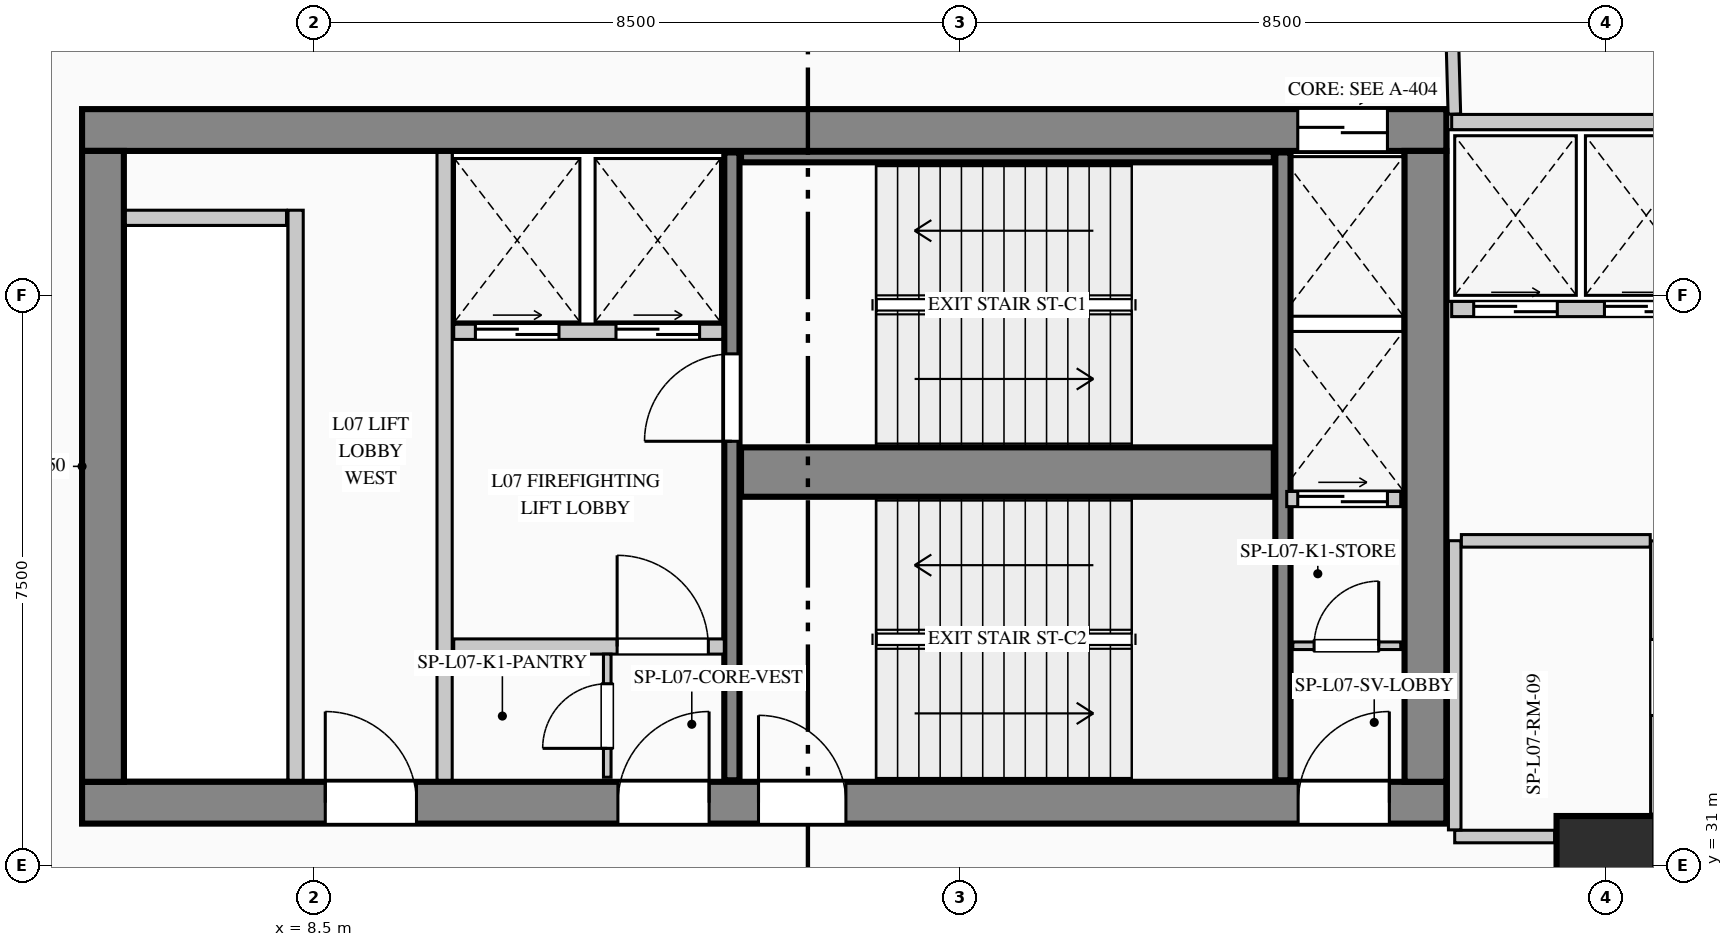
"""IFC4 building model, lengths in metres.
Left out: names, types, materials, properties, quantities, classifications, styles, units other than length and angle.
Written with IfcOpenShell. Run it as: python <this file> out.ifc"""

import sys

from ifc_helpers import new_model, si_unit, direction, frame, frame_2d, origin, origin_2d, place, context, subcontext, project, spatial, rectangle, extrude, element, fill, save


model = new_model("IFC4")
c1 = context("Model", 3, precision=1e-05, world=origin(), true_north=direction((0.0, 1.0)))
c2 = subcontext(c1, "Body", "Model", "MODEL_VIEW")
j1 = project(units=[si_unit("LENGTHUNIT", "METRE"), si_unit("PLANEANGLEUNIT", "RADIAN")], contexts=[c1])
p1 = place(None, origin())
s1 = spatial("IfcSite", under=j1, at=p1, CompositionType="ELEMENT")
p2 = place(p1, origin())
s2 = spatial("IfcBuilding", under=s1, at=p2, CompositionType="ELEMENT")
p3 = place(p2, frame((0.0, 0.0, 31.4)))
s3 = spatial("IfcBuildingStorey", under=s2, at=p3, CompositionType="ELEMENT", Elevation=31.4)
p4 = place(p3, frame((5.45, 40.675, 0.0), z_axis=(0.0, 0.0, 1.0), x_axis=(1.0, 0.0, 0.0)))
e1 = element("IfcWall", 1, at=p4, inside=s3, PredefinedType="SHEAR", context=c2, shape_type="SweptSolid", body=[
    extrude(rectangle(XDim=17.95, YDim=0.55, at=frame_2d((8.975, 0.0))), origin(), (0.0, 0.0, 1.0), 4.4),
])
p5 = place(p4, frame((15.995, 0.0, 0.0)))
e2 = element("IfcOpeningElement", 2, at=p5, cuts=e1, PredefinedType="OPENING", context=c2, shape_type="SweptSolid", body=[
    extrude(rectangle(XDim=1.18, YDim=2.25, at=frame_2d((0.59, 1.125))), frame((0.0, 0.285, 0.0), z_axis=(0.0, -1.0, 0.0), x_axis=(1.0, 0.0, 0.0)), (0.0, 0.0, 1.0), 0.57),
])
p6 = place(p3, frame((5.45, 31.825, 0.0), z_axis=(0.0, 0.0, 1.0), x_axis=(1.0, 0.0, 0.0)))
e3 = element("IfcWall", 3, at=p6, inside=s3, PredefinedType="SHEAR", context=c2, shape_type="SweptSolid", body=[
    extrude(rectangle(XDim=17.95, YDim=0.55, at=frame_2d((8.975, 0.0))), origin(), (0.0, 0.0, 1.0), 4.4),
])
p7 = place(p6, frame((3.2, 0.0, 0.0)))
e4 = element("IfcOpeningElement", 4, at=p7, cuts=e3, PredefinedType="OPENING", context=c2, shape_type="SweptSolid", body=[
    extrude(rectangle(XDim=1.2, YDim=2.2, at=frame_2d((0.6, 1.1))), frame((0.0, 0.285, 0.0), z_axis=(0.0, -1.0, 0.0), x_axis=(1.0, 0.0, 0.0)), (0.0, 0.0, 1.0), 0.57),
])
p8 = place(p6, frame((7.05, 0.0, 0.0)))
e5 = element("IfcOpeningElement", 5, at=p8, cuts=e3, PredefinedType="OPENING", context=c2, shape_type="SweptSolid", body=[
    extrude(rectangle(XDim=1.2, YDim=2.2, at=frame_2d((0.6, 1.1))), frame((0.0, 0.285, 0.0), z_axis=(0.0, -1.0, 0.0), x_axis=(1.0, 0.0, 0.0)), (0.0, 0.0, 1.0), 0.57),
])
p9 = place(p6, frame((8.9, 0.0, 0.0)))
e6 = element("IfcOpeningElement", 6, at=p9, cuts=e3, PredefinedType="OPENING", context=c2, shape_type="SweptSolid", body=[
    extrude(rectangle(XDim=1.15, YDim=2.2, at=frame_2d((0.575, 1.1))), frame((0.0, 0.285, 0.0), z_axis=(0.0, -1.0, 0.0), x_axis=(1.0, 0.0, 0.0)), (0.0, 0.0, 1.0), 0.57),
])
p10 = place(p6, frame((16.0, 0.0, 0.0)))
e7 = element("IfcOpeningElement", 7, at=p10, cuts=e3, PredefinedType="OPENING", context=c2, shape_type="SweptSolid", body=[
    extrude(rectangle(XDim=1.2, YDim=2.2, at=frame_2d((0.6, 1.1))), frame((0.0, 0.285, 0.0), z_axis=(0.0, -1.0, 0.0), x_axis=(1.0, 0.0, 0.0)), (0.0, 0.0, 1.0), 0.57),
])
for number, where, z_axis, x_axis in (
    (8, (5.725, 32.1, 0.0), (0.0, 0.0, 1.0), (0.0, 1.0, 0.0)),
    (9, (23.125, 32.1, 0.0), (0.0, 0.0, 1.0), (0.0, 1.0, 0.0)),
):
    element("IfcWall", number, at=place(p3, frame(where, z_axis=z_axis, x_axis=x_axis)), inside=s3, PredefinedType="SHEAR", context=c2, shape_type="SweptSolid", body=[
        extrude(rectangle(XDim=8.3, YDim=0.55, at=frame_2d((4.15, 0.0))), origin(), (0.0, 0.0, 1.0), 4.4),
    ])
p11 = place(p3, frame((14.0, 32.12, 0.0), z_axis=(0.0, 0.0, 1.0), x_axis=(0.0, 1.0, 0.0)))
e10 = element("IfcWall", 10, at=p11, inside=s3, PredefinedType="SHEAR", context=c2, shape_type="SweptSolid", body=[
    extrude(rectangle(XDim=8.26, YDim=0.2, at=frame_2d((4.13, 0.0))), origin(), (0.0, 0.0, 1.0), 4.4),
])
p12 = place(p11, frame((4.46, 0.0, 0.0)))
e11 = element("IfcOpeningElement", 11, at=p12, cuts=e10, PredefinedType="OPENING", context=c2, shape_type="SweptSolid", body=[
    extrude(rectangle(XDim=1.15, YDim=2.2, at=frame_2d((0.575, 1.1))), frame((0.0, 0.11, 0.0), z_axis=(0.0, -1.0, 0.0), x_axis=(1.0, 0.0, 0.0)), (0.0, 0.0, 1.0), 0.22),
])
p13 = place(p3, frame((14.12, 36.175, 0.0), z_axis=(0.0, 0.0, 1.0), x_axis=(1.0, 0.0, 0.0)))
e12 = element("IfcWall", 12, at=p13, inside=s3, PredefinedType="SHEAR", context=c2, shape_type="SweptSolid", body=[
    extrude(rectangle(XDim=7.01, YDim=0.65, at=frame_2d((3.505, 0.0))), origin(), (0.0, 0.0, 1.0), 4.4),
])
p14 = place(p3, frame((21.25, 32.12, 0.0), z_axis=(0.0, 0.0, 1.0), x_axis=(0.0, 1.0, 0.0)))
e13 = element("IfcWall", 13, at=p14, inside=s3, PredefinedType="SHEAR", context=c2, shape_type="SweptSolid", body=[
    extrude(rectangle(XDim=8.26, YDim=0.2, at=frame_2d((4.13, 0.0))), origin(), (0.0, 0.0, 1.0), 4.4),
])
p15 = place(p3, frame((14.12, 40.32, 0.0), z_axis=(0.0, 0.0, 1.0), x_axis=(1.0, 0.0, 0.0)))
e14 = element("IfcWall", 14, at=p15, inside=s3, PredefinedType="SHEAR", context=c2, shape_type="SweptSolid", body=[
    extrude(rectangle(XDim=7.01, YDim=0.14, at=frame_2d((3.505, 0.0))), origin(), (0.0, 0.0, 1.0), 4.4),
])
p16 = place(p3, frame((25.5, 31.0, 0.0), z_axis=(0.0, 0.0, 1.0), x_axis=(1.0, 0.0, 0.0)))
e15 = element("IfcColumn", 15, at=p16, inside=s3, PredefinedType="COLUMN", context=c2, shape_type="SweptSolid", body=[
    extrude(rectangle(XDim=1.3, YDim=1.3, at=origin_2d()), origin(), (0.0, 0.0, 1.0), 4.4),
])
p17 = place(p3, frame((8.523, 4.84, 0.0), z_axis=(0.0, 0.0, 1.0), x_axis=(-0.150394554312, 0.988626055712, 0.0)))
e16 = element("IfcWall", 16, at=p17, inside=s3, PredefinedType="STANDARD", context=c2, shape_type="SweptSolid", body=[
    extrude(rectangle(XDim=36.738, YDim=0.28, at=frame_2d((18.369, 0.0))), origin(), (0.0, 0.0, 1.0), 4.1),
])
p18 = place(p17, frame((22.762, 0.0, 0.9)))
e17 = element("IfcOpeningElement", 17, at=p18, cuts=e16, PredefinedType="OPENING", context=c2, shape_type="SweptSolid", body=[
    extrude(rectangle(XDim=1.5, YDim=1.8, at=frame_2d((0.75, 0.9))), frame((0.0, 0.15, 0.0), z_axis=(0.0, -1.0, 0.0), x_axis=(1.0, 0.0, 0.0)), (0.0, 0.0, 1.0), 0.3),
])
p19 = place(p3, frame((8.26, 32.12, 0.0), z_axis=(0.0, 0.0, 1.0), x_axis=(0.0, 1.0, 0.0)))
e18 = element("IfcWall", 18, at=p19, inside=s3, PredefinedType="PARTITIONING", context=c2, shape_type="SweptSolid", body=[
    extrude(rectangle(XDim=7.5, YDim=0.2, at=frame_2d((3.75, 0.0))), origin(), (0.0, 0.0, 1.0), 4.1),
])
p20 = place(p3, frame((6.02, 39.52, 0.0), z_axis=(0.0, 0.0, 1.0), x_axis=(1.0, 0.0, 0.0)))
e19 = element("IfcWall", 19, at=p20, inside=s3, PredefinedType="PARTITIONING", context=c2, shape_type="SweptSolid", body=[
    extrude(rectangle(XDim=2.12, YDim=0.2, at=frame_2d((1.06, 0.0))), origin(), (0.0, 0.0, 1.0), 4.1),
])
p21 = place(p3, frame((10.22, 32.12, 0.0), z_axis=(0.0, 0.0, 1.0), x_axis=(0.0, 1.0, 0.0)))
e20 = element("IfcWall", 20, at=p21, inside=s3, PredefinedType="PARTITIONING", context=c2, shape_type="SweptSolid", body=[
    extrude(rectangle(XDim=8.26, YDim=0.2, at=frame_2d((4.13, 0.0))), origin(), (0.0, 0.0, 1.0), 4.1),
])
p22 = place(p3, frame((10.34, 38.02, 0.0), z_axis=(0.0, 0.0, 1.0), x_axis=(1.0, 0.0, 0.0)))
e21 = element("IfcWall", 21, at=p22, inside=s3, PredefinedType="PARTITIONING", context=c2, shape_type="SweptSolid", body=[
    extrude(rectangle(XDim=3.54, YDim=0.2, at=frame_2d((1.77, 0.0))), origin(), (0.0, 0.0, 1.0), 4.1),
])
p23 = place(p22, frame((0.285, 0.0, 0.0)))
e22 = element("IfcOpeningElement", 22, at=p23, cuts=e21, PredefinedType="OPENING", context=c2, shape_type="SweptSolid", body=[
    extrude(rectangle(XDim=1.1, YDim=2.2, at=frame_2d((0.55, 1.1))), frame((0.0, 0.11, 0.0), z_axis=(0.0, -1.0, 0.0), x_axis=(1.0, 0.0, 0.0)), (0.0, 0.0, 1.0), 0.22),
])
p24 = place(p22, frame((2.135, 0.0, 0.0)))
e23 = element("IfcOpeningElement", 23, at=p24, cuts=e21, PredefinedType="OPENING", context=c2, shape_type="SweptSolid", body=[
    extrude(rectangle(XDim=1.1, YDim=2.2, at=frame_2d((0.55, 1.1))), frame((0.0, 0.11, 0.0), z_axis=(0.0, -1.0, 0.0), x_axis=(1.0, 0.0, 0.0)), (0.0, 0.0, 1.0), 0.22),
])
p25 = place(p3, frame((10.34, 33.88, 0.0), z_axis=(0.0, 0.0, 1.0), x_axis=(1.0, 0.0, 0.0)))
e24 = element("IfcWall", 24, at=p25, inside=s3, PredefinedType="PARTITIONING", context=c2, shape_type="SweptSolid", body=[
    extrude(rectangle(XDim=3.56, YDim=0.2, at=frame_2d((1.78, 0.0))), origin(), (0.0, 0.0, 1.0), 4.1),
])
p26 = place(p25, frame((2.15, 0.0, 0.0)))
e25 = element("IfcOpeningElement", 25, at=p26, cuts=e24, PredefinedType="OPENING", context=c2, shape_type="SweptSolid", body=[
    extrude(rectangle(XDim=1.2, YDim=2.2, at=frame_2d((0.6, 1.1))), frame((0.0, 0.11, 0.0), z_axis=(0.0, -1.0, 0.0), x_axis=(1.0, 0.0, 0.0)), (0.0, 0.0, 1.0), 0.22),
])
p27 = place(p3, frame((12.36, 32.16, 0.0), z_axis=(0.0, 0.0, 1.0), x_axis=(0.0, 1.0, 0.0)))
e26 = element("IfcWall", 26, at=p27, inside=s3, PredefinedType="PARTITIONING", context=c2, shape_type="SweptSolid", body=[
    extrude(rectangle(XDim=1.62, YDim=0.1, at=frame_2d((0.81, 0.0))), origin(), (0.0, 0.0, 1.0), 4.1),
])
p28 = place(p27, frame((0.38, 0.0, 0.0)))
e27 = element("IfcOpeningElement", 27, at=p28, cuts=e26, PredefinedType="OPENING", context=c2, shape_type="SweptSolid", body=[
    extrude(rectangle(XDim=0.85, YDim=2.1, at=frame_2d((0.425, 1.05))), frame((0.0, 0.06, 0.0), z_axis=(0.0, -1.0, 0.0), x_axis=(1.0, 0.0, 0.0)), (0.0, 0.0, 1.0), 0.12),
])
p29 = place(p3, frame((21.38, 33.89, 0.0), z_axis=(0.0, 0.0, 1.0), x_axis=(1.0, 0.0, 0.0)))
e28 = element("IfcWall", 28, at=p29, inside=s3, PredefinedType="PARTITIONING", context=c2, shape_type="SweptSolid", body=[
    extrude(rectangle(XDim=1.42, YDim=0.1, at=frame_2d((0.71, 0.0))), origin(), (0.0, 0.0, 1.0), 4.1),
])
p30 = place(p29, frame((0.28, 0.0, 0.0)))
e29 = element("IfcOpeningElement", 29, at=p30, cuts=e28, PredefinedType="OPENING", context=c2, shape_type="SweptSolid", body=[
    extrude(rectangle(XDim=0.85, YDim=2.1, at=frame_2d((0.425, 1.05))), frame((0.0, 0.06, 0.0), z_axis=(0.0, -1.0, 0.0), x_axis=(1.0, 0.0, 0.0)), (0.0, 0.0, 1.0), 0.12),
])
p31 = place(p3, frame((21.3, 35.82, 0.0), z_axis=(0.0, 0.0, 1.0), x_axis=(1.0, 0.0, 0.0)))
e30 = element("IfcWall", 30, at=p31, inside=s3, PredefinedType="PARTITIONING", context=c2, shape_type="SweptSolid", body=[
    extrude(rectangle(XDim=1.5, YDim=0.2, at=frame_2d((0.75, 0.0))), origin(), (0.0, 0.0, 1.0), 4.1),
])
p32 = place(p31, frame((0.145, 0.0, 0.0)))
e31 = element("IfcOpeningElement", 31, at=p32, cuts=e30, PredefinedType="OPENING", context=c2, shape_type="SweptSolid", body=[
    extrude(rectangle(XDim=1.18, YDim=2.25, at=frame_2d((0.59, 1.125))), frame((0.0, 0.11, 0.0), z_axis=(0.0, -1.0, 0.0), x_axis=(1.0, 0.0, 0.0)), (0.0, 0.0, 1.0), 0.22),
])
p33 = place(p3, frame((23.47, 40.78, 0.0), z_axis=(0.0, 0.0, 1.0), x_axis=(1.0, 0.0, 0.0)))
e32 = element("IfcWall", 32, at=p33, inside=s3, PredefinedType="PARTITIONING", context=c2, shape_type="SweptSolid", body=[
    extrude(rectangle(XDim=6.91, YDim=0.2, at=frame_2d((3.455, 0.0))), origin(), (0.0, 0.0, 1.0), 4.1),
])
p34 = place(p3, frame((23.47, 38.32, 0.0), z_axis=(0.0, 0.0, 1.0), x_axis=(1.0, 0.0, 0.0)))
e33 = element("IfcWall", 33, at=p34, inside=s3, PredefinedType="PARTITIONING", context=c2, shape_type="SweptSolid", body=[
    extrude(rectangle(XDim=6.79, YDim=0.2, at=frame_2d((3.395, 0.0))), origin(), (0.0, 0.0, 1.0), 4.1),
])
p35 = place(p34, frame((0.29, 0.0, 0.0)))
e34 = element("IfcOpeningElement", 34, at=p35, cuts=e33, PredefinedType="OPENING", context=c2, shape_type="SweptSolid", body=[
    extrude(rectangle(XDim=1.1, YDim=2.2, at=frame_2d((0.55, 1.1))), frame((0.0, 0.11, 0.0), z_axis=(0.0, -1.0, 0.0), x_axis=(1.0, 0.0, 0.0)), (0.0, 0.0, 1.0), 0.22),
])
p36 = place(p34, frame((2.01, 0.0, 0.0)))
e35 = element("IfcOpeningElement", 35, at=p36, cuts=e33, PredefinedType="OPENING", context=c2, shape_type="SweptSolid", body=[
    extrude(rectangle(XDim=1.1, YDim=2.2, at=frame_2d((0.55, 1.1))), frame((0.0, 0.11, 0.0), z_axis=(0.0, -1.0, 0.0), x_axis=(1.0, 0.0, 0.0)), (0.0, 0.0, 1.0), 0.22),
])
p37 = place(p34, frame((3.73, 0.0, 0.0)))
e36 = element("IfcOpeningElement", 36, at=p37, cuts=e33, PredefinedType="OPENING", context=c2, shape_type="SweptSolid", body=[
    extrude(rectangle(XDim=1.1, YDim=2.2, at=frame_2d((0.55, 1.1))), frame((0.0, 0.11, 0.0), z_axis=(0.0, -1.0, 0.0), x_axis=(1.0, 0.0, 0.0)), (0.0, 0.0, 1.0), 0.22),
])
p38 = place(p34, frame((5.45, 0.0, 0.0)))
e37 = element("IfcOpeningElement", 37, at=p38, cuts=e33, PredefinedType="OPENING", context=c2, shape_type="SweptSolid", body=[
    extrude(rectangle(XDim=1.1, YDim=2.2, at=frame_2d((0.55, 1.1))), frame((0.0, 0.11, 0.0), z_axis=(0.0, -1.0, 0.0), x_axis=(1.0, 0.0, 0.0)), (0.0, 0.0, 1.0), 0.22),
])
p39 = place(p3, frame((26.17, 35.27, 0.0), z_axis=(0.0, 0.0, 1.0), x_axis=(0.0, -1.0, 0.0)))
e38 = element("IfcWall", 38, at=p39, inside=s3, PredefinedType="PARTITIONING", context=c2, shape_type="SweptSolid", body=[
    extrude(rectangle(XDim=3.595, YDim=0.165, at=frame_2d((1.797, 0.0))), origin(), (0.0, 0.0, 1.0), 4.1),
])
p40 = place(p39, frame((1.298, 0.0, 0.0)))
e39 = element("IfcOpeningElement", 39, at=p40, cuts=e38, PredefinedType="OPENING", context=c2, shape_type="SweptSolid", body=[
    extrude(rectangle(XDim=1.0, YDim=2.15, at=frame_2d((0.5, 1.075))), frame((0.0, 0.093, 0.0), z_axis=(0.0, -1.0, 0.0), x_axis=(1.0, 0.0, 0.0)), (0.0, 0.0, 1.0), 0.185),
])
p41 = place(p3, frame((24.825, 31.38, 0.0), z_axis=(0.0, 0.0, 1.0), x_axis=(-1.0, 0.0, 0.0)))
e40 = element("IfcWall", 40, at=p41, inside=s3, PredefinedType="PARTITIONING", context=c2, shape_type="SweptSolid", body=[
    extrude(rectangle(XDim=1.315, YDim=0.165, at=frame_2d((0.657, 0.0))), origin(), (0.0, 0.0, 1.0), 4.1),
])
p42 = place(p3, frame((23.51, 31.468, 0.0), z_axis=(0.0, 0.0, 1.0), x_axis=(0.0, 1.0, 0.0)))
e41 = element("IfcWall", 41, at=p42, inside=s3, PredefinedType="PARTITIONING", context=c2, shape_type="SweptSolid", body=[
    extrude(rectangle(XDim=3.804, YDim=0.165, at=frame_2d((1.902, 0.0))), origin(), (0.0, 0.0, 1.0), 4.1),
])
p43 = place(p3, frame((23.597, 35.27, 0.0), z_axis=(0.0, 0.0, 1.0), x_axis=(1.0, 0.0, 0.0)))
e42 = element("IfcWall", 42, at=p43, inside=s3, PredefinedType="PARTITIONING", context=c2, shape_type="SweptSolid", body=[
    extrude(rectangle(XDim=2.485, YDim=0.165, at=frame_2d((1.243, 0.0))), origin(), (0.0, 0.0, 1.0), 4.1),
])
p44 = place(p3, frame((23.506, 40.885, 0.0), z_axis=(0.0, 0.0, 1.0), x_axis=(-0.027441464163, 0.999623412113, 0.0)))
e43 = element("IfcWall", 43, at=p44, inside=s3, PredefinedType="PARTITIONING", context=c2, shape_type="SweptSolid", body=[
    extrude(rectangle(XDim=2.331, YDim=0.165, at=frame_2d((1.166, 0.0))), origin(), (0.0, 0.0, 1.0), 4.1),
])
p45 = place(p7, origin())
e44 = element("IfcDoor", 44, at=p45, inside=s3, OperationType="SINGLE_SWING_LEFT", PredefinedType="DOOR", context=c2, shape_type="SweptSolid", body=[
    extrude(rectangle(XDim=1.2, YDim=2.2, at=frame_2d((0.6, 1.1))), frame((0.0, 0.025, 0.0), z_axis=(0.0, -1.0, 0.0), x_axis=(1.0, 0.0, 0.0)), (0.0, 0.0, 1.0), 0.05),
])
fill(e4, e44)
p46 = place(p8, origin())
e45 = element("IfcDoor", 45, at=p46, inside=s3, OperationType="SINGLE_SWING_RIGHT", PredefinedType="DOOR", context=c2, shape_type="SweptSolid", body=[
    extrude(rectangle(XDim=1.2, YDim=2.2, at=frame_2d((0.6, 1.1))), frame((0.0, 0.025, 0.0), z_axis=(0.0, -1.0, 0.0), x_axis=(1.0, 0.0, 0.0)), (0.0, 0.0, 1.0), 0.05),
])
fill(e5, e45)
p47 = place(p9, origin())
e46 = element("IfcDoor", 46, at=p47, inside=s3, OperationType="SINGLE_SWING_LEFT", PredefinedType="DOOR", context=c2, shape_type="SweptSolid", body=[
    extrude(rectangle(XDim=1.15, YDim=2.2, at=frame_2d((0.575, 1.1))), frame((0.0, 0.025, 0.0), z_axis=(0.0, -1.0, 0.0), x_axis=(1.0, 0.0, 0.0)), (0.0, 0.0, 1.0), 0.05),
])
fill(e6, e46)
p48 = place(p10, origin())
e47 = element("IfcDoor", 47, at=p48, inside=s3, OperationType="SINGLE_SWING_RIGHT", PredefinedType="DOOR", context=c2, shape_type="SweptSolid", body=[
    extrude(rectangle(XDim=1.2, YDim=2.2, at=frame_2d((0.6, 1.1))), frame((0.0, 0.025, 0.0), z_axis=(0.0, -1.0, 0.0), x_axis=(1.0, 0.0, 0.0)), (0.0, 0.0, 1.0), 0.05),
])
fill(e7, e47)
p49 = place(p26, origin())
e48 = element("IfcDoor", 48, at=p49, inside=s3, OperationType="SINGLE_SWING_LEFT", PredefinedType="DOOR", context=c2, shape_type="SweptSolid", body=[
    extrude(rectangle(XDim=1.2, YDim=2.2, at=frame_2d((0.6, 1.1))), frame((0.0, 0.025, 0.0), z_axis=(0.0, -1.0, 0.0), x_axis=(1.0, 0.0, 0.0)), (0.0, 0.0, 1.0), 0.05),
])
fill(e25, e48)
p50 = place(p28, origin())
e49 = element("IfcDoor", 49, at=p50, inside=s3, OperationType="SINGLE_SWING_LEFT", PredefinedType="DOOR", context=c2, shape_type="SweptSolid", body=[
    extrude(rectangle(XDim=0.85, YDim=2.1, at=frame_2d((0.425, 1.05))), frame((0.0, 0.025, 0.0), z_axis=(0.0, -1.0, 0.0), x_axis=(1.0, 0.0, 0.0)), (0.0, 0.0, 1.0), 0.05),
])
fill(e27, e49)
p51 = place(p30, origin())
e50 = element("IfcDoor", 50, at=p51, inside=s3, OperationType="SINGLE_SWING_RIGHT", PredefinedType="DOOR", context=c2, shape_type="SweptSolid", body=[
    extrude(rectangle(XDim=0.85, YDim=2.1, at=frame_2d((0.425, 1.05))), frame((0.0, 0.025, 0.0), z_axis=(0.0, -1.0, 0.0), x_axis=(1.0, 0.0, 0.0)), (0.0, 0.0, 1.0), 0.05),
])
fill(e29, e50)
p52 = place(p12, origin())
e51 = element("IfcDoor", 51, at=p52, inside=s3, OperationType="SINGLE_SWING_LEFT", PredefinedType="DOOR", context=c2, shape_type="SweptSolid", body=[
    extrude(rectangle(XDim=1.15, YDim=2.2, at=frame_2d((0.575, 1.1))), frame((0.0, 0.025, 0.0), z_axis=(0.0, -1.0, 0.0), x_axis=(1.0, 0.0, 0.0)), (0.0, 0.0, 1.0), 0.05),
])
fill(e11, e51)
p53 = place(p23, origin())
e52 = element("IfcDoor", 52, at=p53, inside=s3, OperationType="DOUBLE_DOOR_SLIDING", PredefinedType="DOOR", context=c2, shape_type="SweptSolid", body=[
    extrude(rectangle(XDim=1.1, YDim=2.2, at=frame_2d((0.55, 1.1))), frame((0.0, 0.025, 0.0), z_axis=(0.0, -1.0, 0.0), x_axis=(1.0, 0.0, 0.0)), (0.0, 0.0, 1.0), 0.05),
])
fill(e22, e52)
p54 = place(p24, origin())
e53 = element("IfcDoor", 53, at=p54, inside=s3, OperationType="DOUBLE_DOOR_SLIDING", PredefinedType="DOOR", context=c2, shape_type="SweptSolid", body=[
    extrude(rectangle(XDim=1.1, YDim=2.2, at=frame_2d((0.55, 1.1))), frame((0.0, 0.025, 0.0), z_axis=(0.0, -1.0, 0.0), x_axis=(1.0, 0.0, 0.0)), (0.0, 0.0, 1.0), 0.05),
])
fill(e23, e53)
p55 = place(p5, origin())
e54 = element("IfcDoor", 54, at=p55, inside=s3, OperationType="DOUBLE_DOOR_SLIDING", PredefinedType="DOOR", context=c2, shape_type="SweptSolid", body=[
    extrude(rectangle(XDim=1.18, YDim=2.25, at=frame_2d((0.59, 1.125))), frame((0.0, 0.025, 0.0), z_axis=(0.0, -1.0, 0.0), x_axis=(1.0, 0.0, 0.0)), (0.0, 0.0, 1.0), 0.05),
])
fill(e2, e54)
p56 = place(p32, origin())
e55 = element("IfcDoor", 55, at=p56, inside=s3, OperationType="DOUBLE_DOOR_SLIDING", PredefinedType="DOOR", context=c2, shape_type="SweptSolid", body=[
    extrude(rectangle(XDim=1.18, YDim=2.25, at=frame_2d((0.59, 1.125))), frame((0.0, 0.025, 0.0), z_axis=(0.0, -1.0, 0.0), x_axis=(1.0, 0.0, 0.0)), (0.0, 0.0, 1.0), 0.05),
])
fill(e31, e55)
p57 = place(p35, origin())
e56 = element("IfcDoor", 56, at=p57, inside=s3, OperationType="DOUBLE_DOOR_SLIDING", PredefinedType="DOOR", context=c2, shape_type="SweptSolid", body=[
    extrude(rectangle(XDim=1.1, YDim=2.2, at=frame_2d((0.55, 1.1))), frame((0.0, 0.025, 0.0), z_axis=(0.0, -1.0, 0.0), x_axis=(1.0, 0.0, 0.0)), (0.0, 0.0, 1.0), 0.05),
])
fill(e34, e56)
p58 = place(p36, origin())
e57 = element("IfcDoor", 57, at=p58, inside=s3, OperationType="DOUBLE_DOOR_SLIDING", PredefinedType="DOOR", context=c2, shape_type="SweptSolid", body=[
    extrude(rectangle(XDim=1.1, YDim=2.2, at=frame_2d((0.55, 1.1))), frame((0.0, 0.025, 0.0), z_axis=(0.0, -1.0, 0.0), x_axis=(1.0, 0.0, 0.0)), (0.0, 0.0, 1.0), 0.05),
])
fill(e35, e57)
save(model, sys.argv[1])
